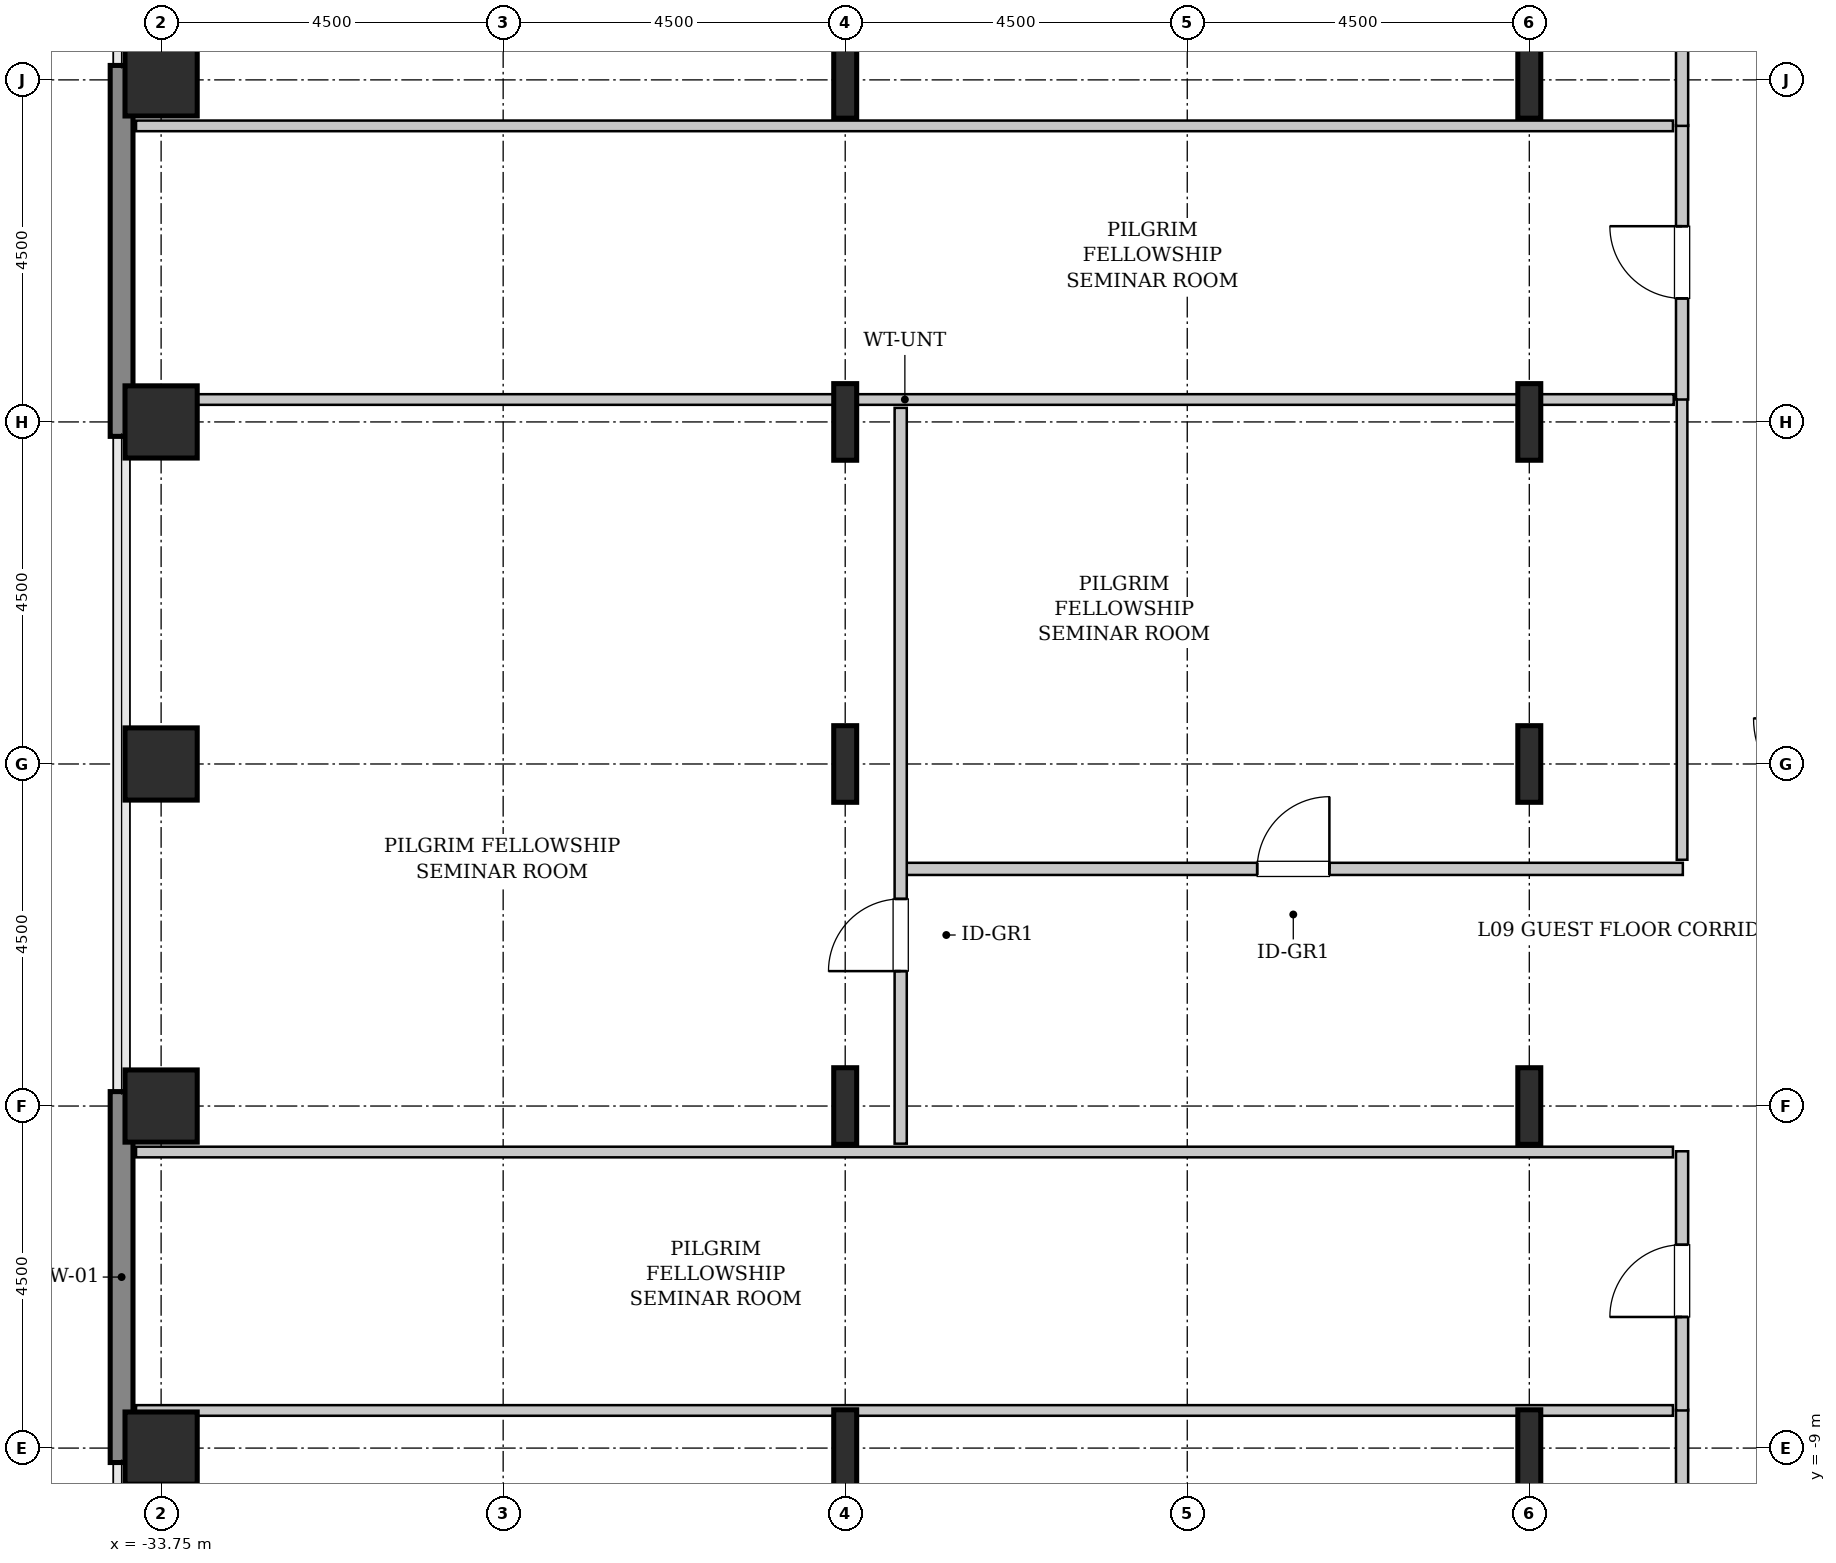
"""IFC4 building model, lengths in metres.
Left out: names, types, materials, properties, quantities, classifications, styles, units other than length and angle.
Written with IfcOpenShell. Run it as: python <this file> out.ifc"""

import sys

from ifc_helpers import new_model, si_unit, direction, frame, frame_2d, origin, origin_2d, place, context, subcontext, project, spatial, rectangle, hollow_rectangle, i_section, extrude, source, transform, mapped, element, fill, save


model = new_model("IFC4")
c1 = context("Model", 3, precision=1e-05, world=origin(), true_north=direction((0.0, 1.0)))
c2 = subcontext(c1, "Body", "Model", "MODEL_VIEW")
j1 = project(units=[si_unit("LENGTHUNIT", "METRE"), si_unit("PLANEANGLEUNIT", "RADIAN")], contexts=[c1])
p1 = place(None, origin())
s1 = spatial("IfcSite", under=j1, at=p1, CompositionType="ELEMENT")
p2 = place(p1, origin())
s2 = spatial("IfcBuilding", under=s1, at=p2, CompositionType="ELEMENT")
p3 = place(p2, frame((0.0, 0.0, 44.4)))
s3 = spatial("IfcBuildingStorey", under=s2, at=p3, CompositionType="ELEMENT", Elevation=44.4)
m1 = source(origin(), c2, "Body", "SweptSolid", [
    extrude(hollow_rectangle(XDim=0.95, YDim=0.95, WallThickness=0.045, InnerFilletRadius=0.045, OuterFilletRadius=0.09, at=origin_2d()), origin(), (0.0, 0.0, 1.0), 3.8),
])
for number, where, z_axis, x_axis in (
    (1, (-33.75, -9.0, 0.0), (0.0, 0.0, 1.0), (1.0, 0.0, 0.0)),
    (2, (-33.75, -4.5, 0.0), (0.0, 0.0, 1.0), (1.0, 0.0, 0.0)),
    (3, (-33.75, 0.0, 0.0), (0.0, 0.0, 1.0), (1.0, 0.0, 0.0)),
    (4, (-33.75, 4.5, 0.0), (0.0, 0.0, 1.0), (1.0, 0.0, 0.0)),
    (5, (-33.75, 9.0, 0.0), (0.0, 0.0, 1.0), (1.0, 0.0, 0.0)),
):
    element("IfcColumn", number, at=place(p3, frame(where, z_axis=z_axis, x_axis=x_axis)), inside=s3, PredefinedType="COLUMN", context=c2, shape_type="MappedRepresentation", body=[
        mapped(m1, transform((0.0, 0.0, 0.0), x_axis=(1.0, 0.0, 0.0), y_axis=(0.0, 1.0, 0.0), z_axis=(0.0, 0.0, 1.0), scale=1.0)),
    ])
m2 = source(origin(), c2, "Body", "SweptSolid", [
    extrude(i_section(OverallWidth=0.302, OverallDepth=1.008, WebThickness=0.021, FlangeThickness=0.04, FilletRadius=0.03, at=origin_2d()), origin(), (0.0, 0.0, 1.0), 3.8),
])
for number, where, z_axis, x_axis in (
    (6, (-24.75, -9.0, 0.0), (0.0, 0.0, 1.0), (1.0, 0.0, 0.0)),
    (7, (-24.75, -4.5, 0.0), (0.0, 0.0, 1.0), (1.0, 0.0, 0.0)),
    (8, (-24.75, 0.0, 0.0), (0.0, 0.0, 1.0), (1.0, 0.0, 0.0)),
    (9, (-24.75, 4.5, 0.0), (0.0, 0.0, 1.0), (1.0, 0.0, 0.0)),
    (10, (-24.75, 9.0, 0.0), (0.0, 0.0, 1.0), (1.0, 0.0, 0.0)),
    (11, (-15.75, -9.0, 0.0), (0.0, 0.0, 1.0), (1.0, 0.0, 0.0)),
    (12, (-15.75, -4.5, 0.0), (0.0, 0.0, 1.0), (1.0, 0.0, 0.0)),
    (13, (-15.75, 0.0, 0.0), (0.0, 0.0, 1.0), (1.0, 0.0, 0.0)),
    (14, (-15.75, 4.5, 0.0), (0.0, 0.0, 1.0), (1.0, 0.0, 0.0)),
    (15, (-15.75, 9.0, 0.0), (0.0, 0.0, 1.0), (1.0, 0.0, 0.0)),
):
    element("IfcColumn", number, at=place(p3, frame(where, z_axis=z_axis, x_axis=x_axis)), inside=s3, PredefinedType="COLUMN", context=c2, shape_type="MappedRepresentation", body=[
        mapped(m2, transform((0.0, 0.0, 0.0), x_axis=(1.0, 0.0, 0.0), y_axis=(0.0, 1.0, 0.0), z_axis=(0.0, 0.0, 1.0), scale=1.0)),
    ])
m3 = source(origin(), c2, "Body", "SweptSolid", [
    extrude(rectangle(XDim=4.88, YDim=0.3, at=frame_2d((2.44, 0.0))), origin(), (0.0, 0.0, 1.0), 3.55),
])
for number, where, z_axis, x_axis in (
    (16, (-34.27, -9.19, 0.0), (0.0, 0.0, 1.0), (0.0, 1.0, 0.0)),
    (17, (-34.27, 4.31, 0.0), (0.0, 0.0, 1.0), (0.0, 1.0, 0.0)),
):
    element("IfcWall", number, at=place(p3, frame(where, z_axis=z_axis, x_axis=x_axis)), inside=s3, PredefinedType="SHEAR", context=c2, shape_type="MappedRepresentation", body=[
        mapped(m3, transform((0.0, 0.0, 0.0), x_axis=(1.0, 0.0, 0.0), y_axis=(0.0, 1.0, 0.0), z_axis=(0.0, 0.0, 1.0), scale=1.0)),
    ])
m4 = source(origin(), c2, "Body", "SweptSolid", [
    extrude(rectangle(XDim=12.745, YDim=0.16, at=frame_2d((6.373, 0.0))), origin(), (0.0, 0.0, 1.0), 3.535),
])
p4 = place(p3, frame((-13.74, -21.24, 0.0), z_axis=(0.0, 0.0, 1.0), x_axis=(0.0, 1.0, 0.0)))
e18 = element("IfcWall", 18, at=p4, inside=s3, PredefinedType="PARTITIONING", context=c2, shape_type="MappedRepresentation", body=[
    mapped(m4, transform((0.0, 0.0, 0.0), x_axis=(1.0, 0.0, 0.0), y_axis=(0.0, 1.0, 0.0), z_axis=(0.0, 0.0, 1.0), scale=1.0)),
])
p5 = place(p4, frame((10.762, 0.0, 0.0)))
e19 = element("IfcOpeningElement", 19, at=p5, cuts=e18, PredefinedType="OPENING", context=c2, shape_type="SweptSolid", body=[
    extrude(rectangle(XDim=0.95, YDim=2.1, at=frame_2d((0.475, 1.05))), frame((0.0, 0.09, 0.0), z_axis=(0.0, -1.0, 0.0), x_axis=(1.0, 0.0, 0.0)), (0.0, 0.0, 1.0), 0.18),
])
m5 = source(origin(), c2, "Body", "SweptSolid", [
    extrude(rectangle(XDim=20.22, YDim=0.14, at=frame_2d((10.11, 0.0))), origin(), (0.0, 0.0, 1.0), 2.825),
])
p6 = place(p3, frame((-34.08, -8.505, 0.0), z_axis=(0.0, 0.0, 1.0), x_axis=(1.0, 0.0, 0.0)))
e20 = element("IfcWall", 20, at=p6, inside=s3, PredefinedType="PARTITIONING", context=c2, shape_type="MappedRepresentation", body=[
    mapped(m5, transform((0.0, 0.0, 0.0), x_axis=(1.0, 0.0, 0.0), y_axis=(0.0, 1.0, 0.0), z_axis=(0.0, 0.0, 1.0), scale=1.0)),
])
m6 = source(origin(), c2, "Body", "SweptSolid", [
    extrude(rectangle(XDim=3.41, YDim=0.16, at=frame_2d((1.705, 0.0))), origin(), (0.0, 0.0, 1.0), 3.535),
])
p7 = place(p3, frame((-13.74, -8.505, 0.0), z_axis=(0.0, 0.0, 1.0), x_axis=(0.0, 1.0, 0.0)))
e21 = element("IfcWall", 21, at=p7, inside=s3, PredefinedType="PARTITIONING", context=c2, shape_type="MappedRepresentation", body=[
    mapped(m6, transform((0.0, 0.0, 0.0), x_axis=(1.0, 0.0, 0.0), y_axis=(0.0, 1.0, 0.0), z_axis=(0.0, 0.0, 1.0), scale=1.0)),
])
p8 = place(p7, frame((1.23, 0.0, 0.0)))
e22 = element("IfcOpeningElement", 22, at=p8, cuts=e21, PredefinedType="OPENING", context=c2, shape_type="SweptSolid", body=[
    extrude(rectangle(XDim=0.95, YDim=2.1, at=frame_2d((0.475, 1.05))), frame((0.0, 0.09, 0.0), z_axis=(0.0, -1.0, 0.0), x_axis=(1.0, 0.0, 0.0)), (0.0, 0.0, 1.0), 0.18),
])
m7 = source(origin(), c2, "Body", "SweptSolid", [
    extrude(rectangle(XDim=20.22, YDim=0.14, at=frame_2d((10.11, 0.0))), origin(), (0.0, 0.0, 1.0), 3.535),
])
p9 = place(p3, frame((-34.08, -5.105, 0.0), z_axis=(0.0, 0.0, 1.0), x_axis=(1.0, 0.0, 0.0)))
e23 = element("IfcWall", 23, at=p9, inside=s3, PredefinedType="PARTITIONING", context=c2, shape_type="MappedRepresentation", body=[
    mapped(m7, transform((0.0, 0.0, 0.0), x_axis=(1.0, 0.0, 0.0), y_axis=(0.0, 1.0, 0.0), z_axis=(0.0, 0.0, 1.0), scale=1.0)),
])
m8 = source(origin(), c2, "Body", "SweptSolid", [
    extrude(rectangle(XDim=10.25, YDim=0.16, at=frame_2d((5.125, 0.0))), origin(), (0.0, 0.0, 1.0), 3.535),
])
p10 = place(p3, frame((-23.98, -1.38, 0.0), z_axis=(0.0, 0.0, 1.0), x_axis=(1.0, 0.0, 0.0)))
e24 = element("IfcWall", 24, at=p10, inside=s3, PredefinedType="PARTITIONING", context=c2, shape_type="MappedRepresentation", body=[
    mapped(m8, transform((0.0, 0.0, 0.0), x_axis=(1.0, 0.0, 0.0), y_axis=(0.0, 1.0, 0.0), z_axis=(0.0, 0.0, 1.0), scale=1.0)),
])
p11 = place(p10, frame((4.65, 0.0, 0.0)))
e25 = element("IfcOpeningElement", 25, at=p11, cuts=e24, PredefinedType="OPENING", context=c2, shape_type="SweptSolid", body=[
    extrude(rectangle(XDim=0.95, YDim=2.1, at=frame_2d((0.475, 1.05))), frame((0.0, 0.09, 0.0), z_axis=(0.0, -1.0, 0.0), x_axis=(1.0, 0.0, 0.0)), (0.0, 0.0, 1.0), 0.18),
])
m9 = source(origin(), c2, "Body", "SweptSolid", [
    extrude(rectangle(XDim=6.065, YDim=0.14, at=frame_2d((3.032, 0.0))), origin(), (0.0, 0.0, 1.0), 3.535),
])
p12 = place(p3, frame((-13.74, -1.26, 0.0), z_axis=(0.0, 0.0, 1.0), x_axis=(0.0, 1.0, 0.0)))
e26 = element("IfcWall", 26, at=p12, inside=s3, PredefinedType="PARTITIONING", context=c2, shape_type="MappedRepresentation", body=[
    mapped(m9, transform((0.0, 0.0, 0.0), x_axis=(1.0, 0.0, 0.0), y_axis=(0.0, 1.0, 0.0), z_axis=(0.0, 0.0, 1.0), scale=1.0)),
])
m10 = source(origin(), c2, "Body", "SweptSolid", [
    extrude(rectangle(XDim=20.23, YDim=0.14, at=frame_2d((10.115, 0.0))), origin(), (0.0, 0.0, 1.0), 2.825),
])
p13 = place(p3, frame((-34.08, 4.795, 0.0), z_axis=(0.0, 0.0, 1.0), x_axis=(1.0, 0.0, 0.0)))
e27 = element("IfcWall", 27, at=p13, inside=s3, PredefinedType="PARTITIONING", context=c2, shape_type="MappedRepresentation", body=[
    mapped(m10, transform((0.0, 0.0, 0.0), x_axis=(1.0, 0.0, 0.0), y_axis=(0.0, 1.0, 0.0), z_axis=(0.0, 0.0, 1.0), scale=1.0)),
])
m11 = source(origin(), c2, "Body", "SweptSolid", [
    extrude(rectangle(XDim=9.68, YDim=0.16, at=frame_2d((4.84, 0.0))), origin(), (0.0, 0.0, 1.0), 3.535),
])
p14 = place(p3, frame((-24.02, -4.995, 0.0), z_axis=(0.0, 0.0, 1.0), x_axis=(0.0, 1.0, 0.0)))
e28 = element("IfcWall", 28, at=p14, inside=s3, PredefinedType="PARTITIONING", context=c2, shape_type="MappedRepresentation", body=[
    mapped(m11, transform((0.0, 0.0, 0.0), x_axis=(1.0, 0.0, 0.0), y_axis=(0.0, 1.0, 0.0), z_axis=(0.0, 0.0, 1.0), scale=1.0)),
])
p15 = place(p14, frame((2.27, 0.0, 0.0)))
e29 = element("IfcOpeningElement", 29, at=p15, cuts=e28, PredefinedType="OPENING", context=c2, shape_type="SweptSolid", body=[
    extrude(rectangle(XDim=0.95, YDim=2.1, at=frame_2d((0.475, 1.05))), frame((0.0, 0.09, 0.0), z_axis=(0.0, -1.0, 0.0), x_axis=(1.0, 0.0, 0.0)), (0.0, 0.0, 1.0), 0.18),
])
m12 = source(origin(), c2, "Body", "SweptSolid", [
    extrude(rectangle(XDim=3.61, YDim=0.16, at=frame_2d((1.805, 0.0))), origin(), (0.0, 0.0, 1.0), 3.535),
])
p16 = place(p3, frame((-13.74, 4.795, 0.0), z_axis=(0.0, 0.0, 1.0), x_axis=(0.0, 1.0, 0.0)))
e30 = element("IfcWall", 30, at=p16, inside=s3, PredefinedType="PARTITIONING", context=c2, shape_type="MappedRepresentation", body=[
    mapped(m12, transform((0.0, 0.0, 0.0), x_axis=(1.0, 0.0, 0.0), y_axis=(0.0, 1.0, 0.0), z_axis=(0.0, 0.0, 1.0), scale=1.0)),
])
p17 = place(p16, frame((1.33, 0.0, 0.0)))
e31 = element("IfcOpeningElement", 31, at=p17, cuts=e30, PredefinedType="OPENING", context=c2, shape_type="SweptSolid", body=[
    extrude(rectangle(XDim=0.95, YDim=2.1, at=frame_2d((0.475, 1.05))), frame((0.0, 0.09, 0.0), z_axis=(0.0, -1.0, 0.0), x_axis=(1.0, 0.0, 0.0)), (0.0, 0.0, 1.0), 0.18),
])
p18 = place(p3, frame((-34.08, 8.395, 0.0), z_axis=(0.0, 0.0, 1.0), x_axis=(1.0, 0.0, 0.0)))
e32 = element("IfcWall", 32, at=p18, inside=s3, PredefinedType="PARTITIONING", context=c2, shape_type="MappedRepresentation", body=[
    mapped(m7, transform((0.0, 0.0, 0.0), x_axis=(1.0, 0.0, 0.0), y_axis=(0.0, 1.0, 0.0), z_axis=(0.0, 0.0, 1.0), scale=1.0)),
])
m13 = source(origin(), c2, "Body", "SweptSolid", [
    extrude(rectangle(XDim=12.845, YDim=0.16, at=frame_2d((6.422, 0.0))), origin(), (0.0, 0.0, 1.0), 3.535),
])
p19 = place(p3, frame((-13.74, 8.395, 0.0), z_axis=(0.0, 0.0, 1.0), x_axis=(0.0, 1.0, 0.0)))
e33 = element("IfcWall", 33, at=p19, inside=s3, PredefinedType="PARTITIONING", context=c2, shape_type="MappedRepresentation", body=[
    mapped(m13, transform((0.0, 0.0, 0.0), x_axis=(1.0, 0.0, 0.0), y_axis=(0.0, 1.0, 0.0), z_axis=(0.0, 0.0, 1.0), scale=1.0)),
])
p20 = place(p19, frame((1.083, 0.0, 0.0)))
e34 = element("IfcOpeningElement", 34, at=p20, cuts=e33, PredefinedType="OPENING", context=c2, shape_type="SweptSolid", body=[
    extrude(rectangle(XDim=0.95, YDim=2.1, at=frame_2d((0.475, 1.05))), frame((0.0, 0.09, 0.0), z_axis=(0.0, -1.0, 0.0), x_axis=(1.0, 0.0, 0.0)), (0.0, 0.0, 1.0), 0.18),
])
m14 = source(origin(), c2, "Body", "SweptSolid", [
    extrude(rectangle(XDim=0.95, YDim=2.1, at=frame_2d((0.475, 1.05))), frame((0.0, 0.025, 0.0), z_axis=(0.0, -1.0, 0.0), x_axis=(1.0, 0.0, 0.0)), (0.0, 0.0, 1.0), 0.05),
])
p21 = place(p8, origin())
e35 = element("IfcDoor", 35, at=p21, inside=s3, OperationType="SINGLE_SWING_LEFT", PredefinedType="DOOR", context=c2, shape_type="MappedRepresentation", body=[
    mapped(m14, transform((0.0, 0.0, 0.0), x_axis=(1.0, 0.0, 0.0), y_axis=(0.0, 1.0, 0.0), z_axis=(0.0, 0.0, 1.0), scale=1.0)),
])
fill(e22, e35)
p22 = place(p11, origin())
e36 = element("IfcDoor", 36, at=p22, inside=s3, OperationType="SINGLE_SWING_RIGHT", PredefinedType="DOOR", context=c2, shape_type="MappedRepresentation", body=[
    mapped(m14, transform((0.0, 0.0, 0.0), x_axis=(1.0, 0.0, 0.0), y_axis=(0.0, 1.0, 0.0), z_axis=(0.0, 0.0, 1.0), scale=1.0)),
])
fill(e25, e36)
p23 = place(p15, origin())
e37 = element("IfcDoor", 37, at=p23, inside=s3, OperationType="SINGLE_SWING_LEFT", PredefinedType="DOOR", context=c2, shape_type="MappedRepresentation", body=[
    mapped(m14, transform((0.0, 0.0, 0.0), x_axis=(1.0, 0.0, 0.0), y_axis=(0.0, 1.0, 0.0), z_axis=(0.0, 0.0, 1.0), scale=1.0)),
])
fill(e29, e37)
p24 = place(p17, origin())
e38 = element("IfcDoor", 38, at=p24, inside=s3, OperationType="SINGLE_SWING_RIGHT", PredefinedType="DOOR", context=c2, shape_type="MappedRepresentation", body=[
    mapped(m14, transform((0.0, 0.0, 0.0), x_axis=(1.0, 0.0, 0.0), y_axis=(0.0, 1.0, 0.0), z_axis=(0.0, 0.0, 1.0), scale=1.0)),
])
fill(e31, e38)
save(model, sys.argv[1])
